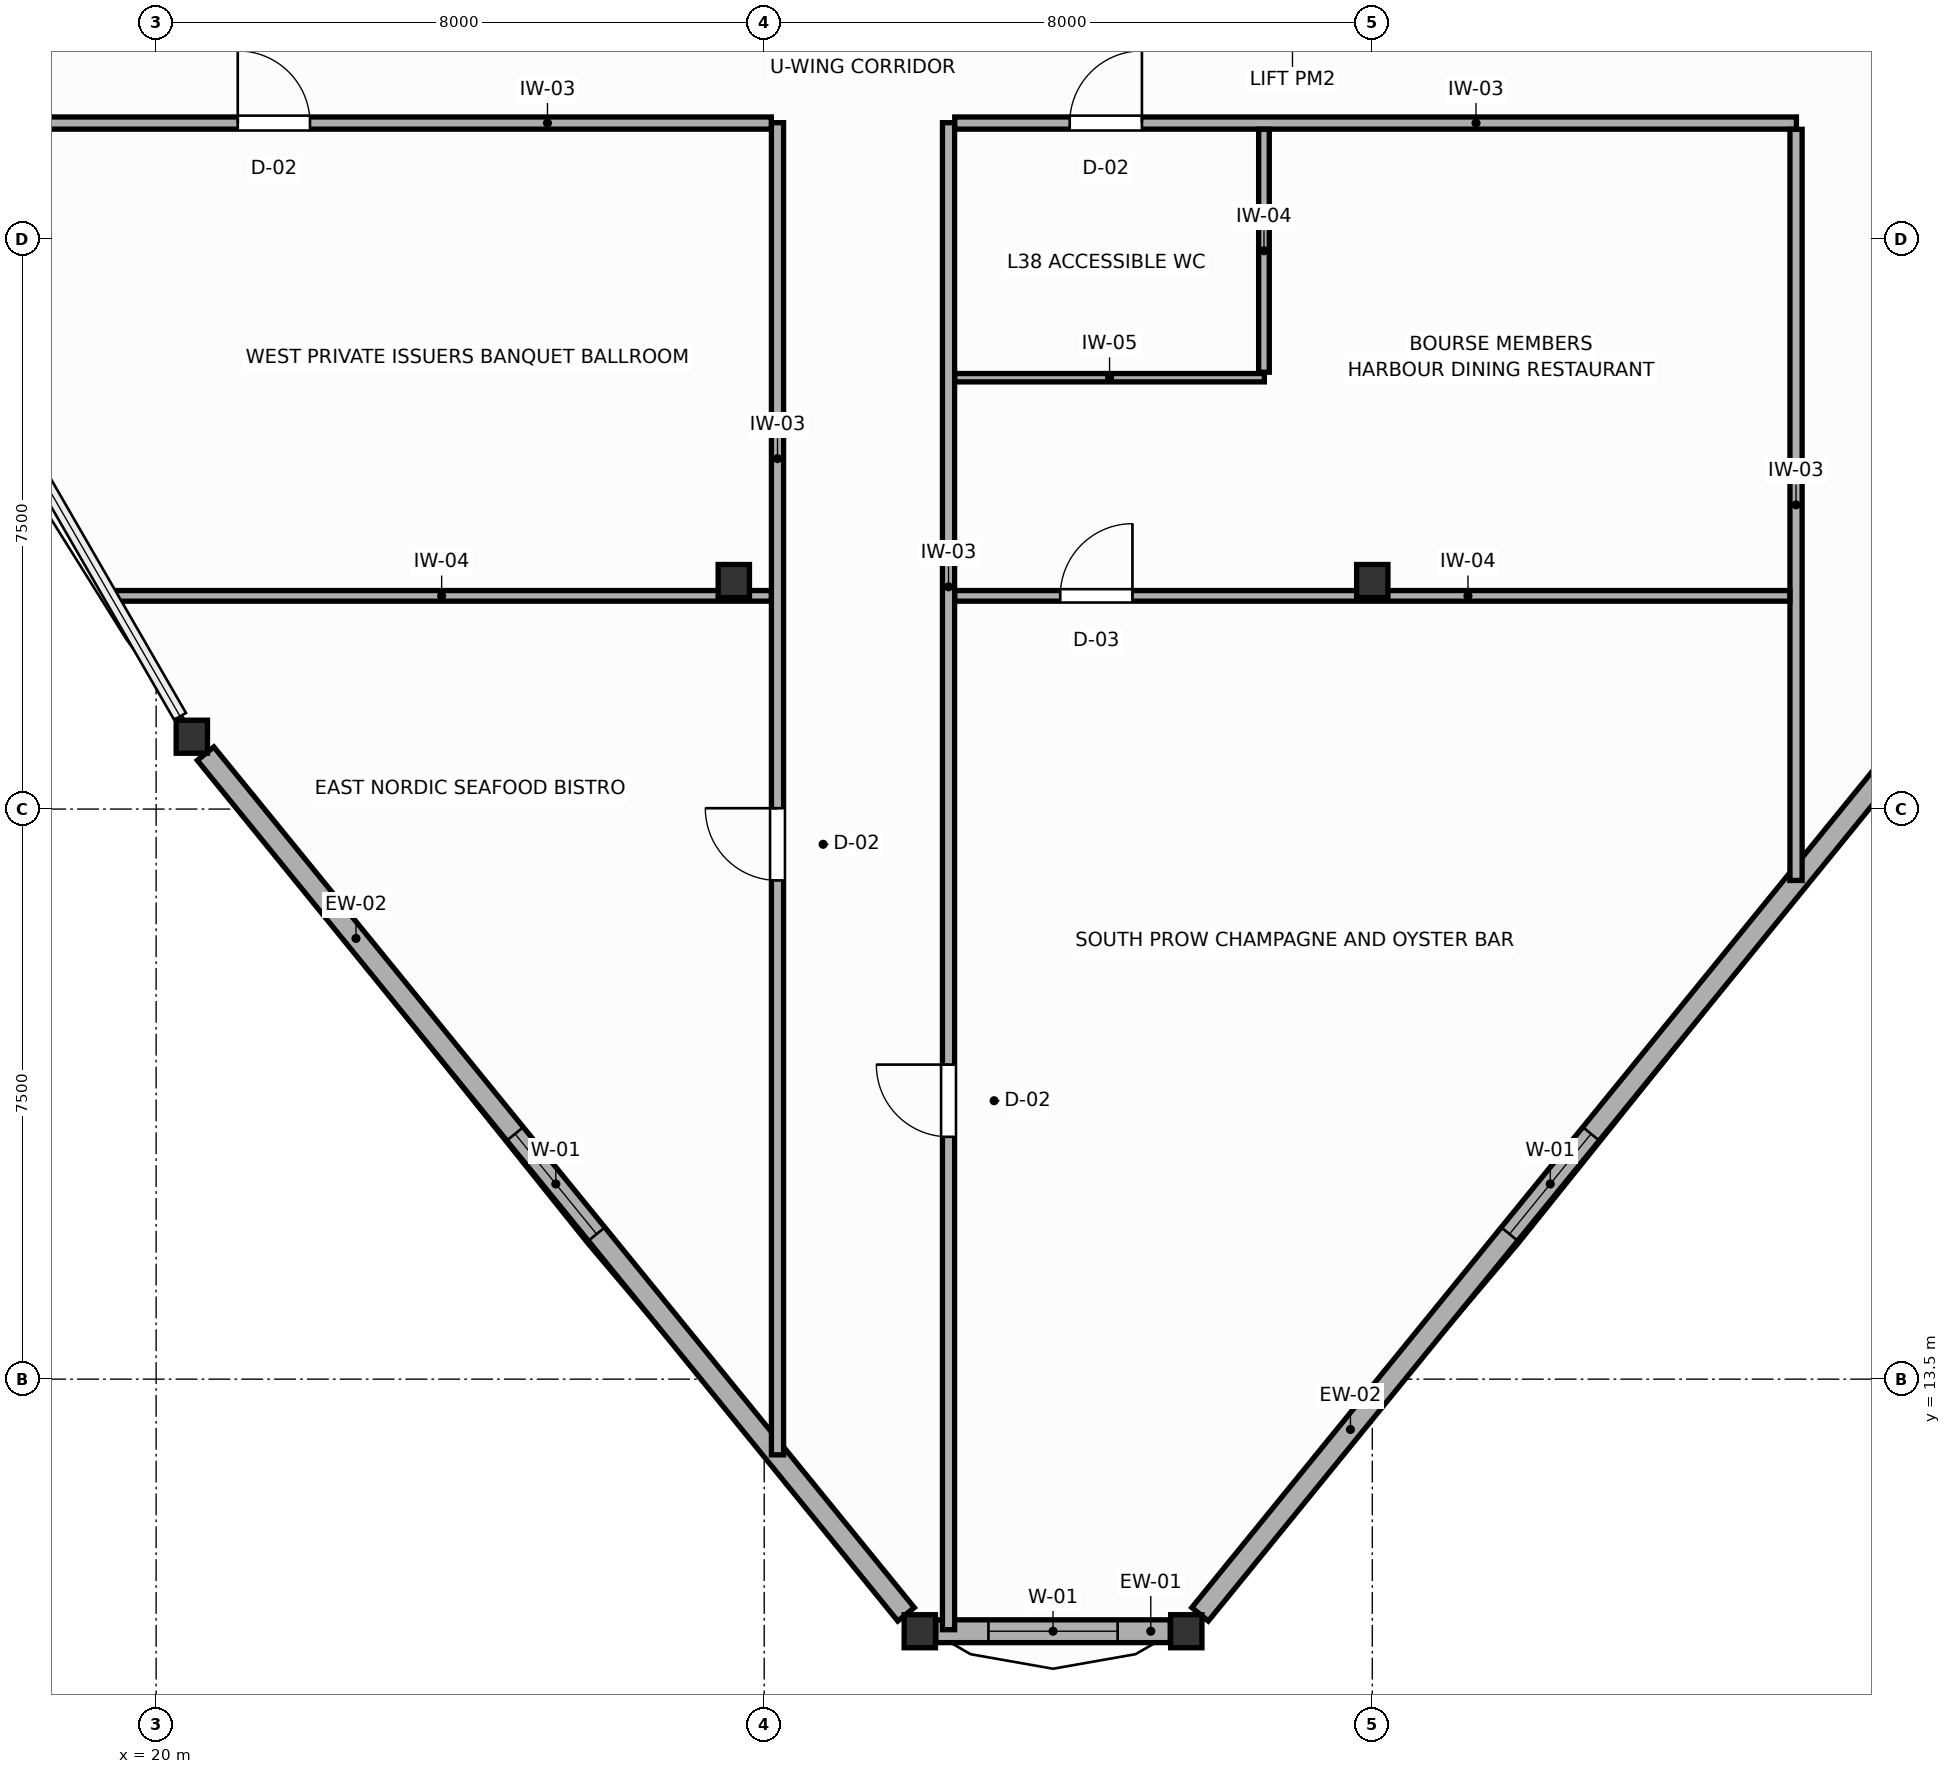
"""IFC4 building model, lengths in metres.
Left out: names, types, materials, properties, quantities, classifications, styles, units other than length and angle.
Written with IfcOpenShell. Run it as: python <this file> out.ifc"""

import sys

from ifc_helpers import new_model, si_unit, direction, frame, frame_2d, origin, origin_2d, place, context, subcontext, project, spatial, rectangle, i_section, extrude, source, transform, mapped, element, fill, save


model = new_model("IFC4")
c1 = context("Model", 3, precision=1e-05, world=origin(), true_north=direction((0.0, 1.0)))
c2 = subcontext(c1, "Body", "Model", "MODEL_VIEW")
j1 = project(units=[si_unit("LENGTHUNIT", "METRE"), si_unit("PLANEANGLEUNIT", "RADIAN")], contexts=[c1])
p1 = place(None, origin())
s1 = spatial("IfcSite", under=j1, at=p1, CompositionType="ELEMENT")
p2 = place(p1, origin())
s2 = spatial("IfcBuilding", under=s1, at=p2, CompositionType="ELEMENT")
p3 = place(p2, frame((0.0, 0.0, 150.6)))
s3 = spatial("IfcBuildingStorey", under=s2, at=p3, CompositionType="ELEMENT", Elevation=150.6)
m1 = source(origin(), c2, "Body", "SweptSolid", [
    extrude(i_section(OverallWidth=0.412, OverallDepth=0.435, WebThickness=0.033, FlangeThickness=0.053, FilletRadius=0.015, at=origin_2d()), origin(), (0.0, 0.0, 1.0), 3.6),
])
for number, where, z_axis, x_axis in (
    (1, (27.6, 24.0, 0.0), (0.0, 0.0, 1.0), (1.0, 0.0, 0.0)),
    (2, (36.0, 24.0, 0.0), (0.0, 0.0, 1.0), (1.0, 0.0, 0.0)),
    (3, (20.469, 21.952, 0.0), (0.0, 0.0, 1.0), (1.0, 0.0, 0.0)),
    (4, (30.047, 10.184, 0.0), (0.0, 0.0, 1.0), (1.0, 0.0, 0.0)),
    (5, (33.553, 10.184, 0.0), (0.0, 0.0, 1.0), (1.0, 0.0, 0.0)),
):
    element("IfcColumn", number, at=place(p3, frame(where, z_axis=z_axis, x_axis=x_axis)), inside=s3, PredefinedType="COLUMN", context=c2, shape_type="MappedRepresentation", body=[
        mapped(m1, transform((0.0, 0.0, 0.0), scale=1.0)),
    ])
p4 = place(p3, frame((20.651, 21.729, 0.0), z_axis=(0.0, 0.0, 1.0), x_axis=(0.631219465915, -0.775604271423, 0.0)))
e6 = element("IfcWall", 6, at=p4, inside=s3, PredefinedType="SOLIDWALL", context=c2, shape_type="SweptSolid", body=[
    extrude(rectangle(XDim=14.599, YDim=0.28, at=frame_2d((7.3, 0.0))), origin(), (0.0, 0.0, 1.0), 3.0),
])
p5 = place(p4, frame((6.45, 0.0, 0.75)))
e7 = element("IfcOpeningElement", 7, at=p5, cuts=e6, PredefinedType="OPENING", context=c2, shape_type="SweptSolid", body=[
    extrude(rectangle(XDim=1.7, YDim=1.75, at=frame_2d((0.85, 0.875))), frame((0.0, 0.15, 0.0), z_axis=(0.0, -1.0, 0.0), x_axis=(1.0, 0.0, 0.0)), (0.0, 0.0, 1.0), 0.3),
])
p6 = place(p3, frame((30.258, 10.184, 0.0), z_axis=(0.0, 0.0, 1.0), x_axis=(1.0, 0.0, 0.0)))
e8 = element("IfcWall", 8, at=p6, inside=s3, PredefinedType="SOLIDWALL", context=c2, shape_type="SweptSolid", body=[
    extrude(rectangle(XDim=3.084, YDim=0.3, at=frame_2d((1.542, 0.0))), origin(), (0.0, 0.0, 1.0), 3.0),
])
p7 = place(p6, frame((0.692, 0.0, 0.75)))
e9 = element("IfcOpeningElement", 9, at=p7, cuts=e8, PredefinedType="OPENING", context=c2, shape_type="SweptSolid", body=[
    extrude(rectangle(XDim=1.7, YDim=1.75, at=frame_2d((0.85, 0.875))), frame((0.0, 0.16, 0.0), z_axis=(0.0, -1.0, 0.0), x_axis=(1.0, 0.0, 0.0)), (0.0, 0.0, 1.0), 0.32),
])
p8 = place(p3, frame((33.734, 10.406, 0.0), z_axis=(0.0, 0.0, 1.0), x_axis=(0.631219465915, 0.775604271423, 0.0)))
e10 = element("IfcWall", 10, at=p8, inside=s3, PredefinedType="SOLIDWALL", context=c2, shape_type="SweptSolid", body=[
    extrude(rectangle(XDim=14.599, YDim=0.28, at=frame_2d((7.3, 0.0))), origin(), (0.0, 0.0, 1.0), 3.0),
])
p9 = place(p8, frame((6.45, 0.0, 0.75)))
e11 = element("IfcOpeningElement", 11, at=p9, cuts=e10, PredefinedType="OPENING", context=c2, shape_type="SweptSolid", body=[
    extrude(rectangle(XDim=1.7, YDim=1.75, at=frame_2d((0.85, 0.875))), frame((0.0, 0.15, 0.0), z_axis=(0.0, -1.0, 0.0), x_axis=(1.0, 0.0, 0.0)), (0.0, 0.0, 1.0), 0.3),
])
p10 = place(p3, frame((30.425, 10.204, 0.0), z_axis=(0.0, 0.0, 1.0), x_axis=(0.0, 1.0, 0.0)))
e12 = element("IfcWall", 12, at=p10, inside=s3, PredefinedType="PARTITIONING", context=c2, shape_type="SweptSolid", body=[
    extrude(rectangle(XDim=19.826, YDim=0.16, at=frame_2d((9.913, 0.0))), origin(), (0.0, 0.0, 1.0), 3.4),
])
p11 = place(p10, frame((6.484, 0.0, 0.0)))
e13 = element("IfcOpeningElement", 13, at=p11, cuts=e12, PredefinedType="OPENING", context=c2, shape_type="SweptSolid", body=[
    extrude(rectangle(XDim=0.95, YDim=2.05, at=frame_2d((0.475, 1.025))), frame((0.0, 0.09, 0.0), z_axis=(0.0, -1.0, 0.0), x_axis=(1.0, 0.0, 0.0)), (0.0, 0.0, 1.0), 0.18),
])
p12 = place(p3, frame((28.175, 12.504, 0.0), z_axis=(0.0, 0.0, 1.0), x_axis=(0.0, 1.0, 0.0)))
e14 = element("IfcWall", 14, at=p12, inside=s3, PredefinedType="PARTITIONING", context=c2, shape_type="SweptSolid", body=[
    extrude(rectangle(XDim=17.526, YDim=0.16, at=frame_2d((8.763, 0.0))), origin(), (0.0, 0.0, 1.0), 2.95),
])
p13 = place(p12, frame((7.557, 0.0, 0.0)))
e15 = element("IfcOpeningElement", 15, at=p13, cuts=e14, PredefinedType="OPENING", context=c2, shape_type="SweptSolid", body=[
    extrude(rectangle(XDim=0.95, YDim=2.05, at=frame_2d((0.475, 1.025))), frame((0.0, 0.09, 0.0), z_axis=(0.0, -1.0, 0.0), x_axis=(1.0, 0.0, 0.0)), (0.0, 0.0, 1.0), 0.18),
])
p14 = place(p3, frame((15.829, 30.025, 0.0), z_axis=(0.0, 0.0, 1.0), x_axis=(1.0, 0.0, 0.0)))
e16 = element("IfcWall", 16, at=p14, inside=s3, PredefinedType="PARTITIONING", context=c2, shape_type="SweptSolid", body=[
    extrude(rectangle(XDim=12.264, YDim=0.16, at=frame_2d((6.132, 0.0))), origin(), (0.0, 0.0, 1.0), 3.4),
])
p15 = place(p14, frame((5.245, 0.0, 0.0)))
e17 = element("IfcOpeningElement", 17, at=p15, cuts=e16, PredefinedType="OPENING", context=c2, shape_type="SweptSolid", body=[
    extrude(rectangle(XDim=0.95, YDim=2.05, at=frame_2d((0.475, 1.025))), frame((0.0, 0.09, 0.0), z_axis=(0.0, -1.0, 0.0), x_axis=(1.0, 0.0, 0.0)), (0.0, 0.0, 1.0), 0.18),
])
p16 = place(p3, frame((30.507, 30.025, 0.0), z_axis=(0.0, 0.0, 1.0), x_axis=(1.0, 0.0, 0.0)))
e18 = element("IfcWall", 18, at=p16, inside=s3, PredefinedType="PARTITIONING", context=c2, shape_type="SweptSolid", body=[
    extrude(rectangle(XDim=11.073, YDim=0.16, at=frame_2d((5.537, 0.0))), origin(), (0.0, 0.0, 1.0), 3.4),
])
p17 = place(p16, frame((1.512, 0.0, 0.0)))
e19 = element("IfcOpeningElement", 19, at=p17, cuts=e18, PredefinedType="OPENING", context=c2, shape_type="SweptSolid", body=[
    extrude(rectangle(XDim=0.95, YDim=2.05, at=frame_2d((0.475, 1.025))), frame((0.0, 0.09, 0.0), z_axis=(0.0, -1.0, 0.0), x_axis=(1.0, 0.0, 0.0)), (0.0, 0.0, 1.0), 0.18),
])
p18 = place(p3, frame((41.575, 20.061, 0.0), z_axis=(0.0, 0.0, 1.0), x_axis=(0.0, 1.0, 0.0)))
e20 = element("IfcWall", 20, at=p18, inside=s3, PredefinedType="PARTITIONING", context=c2, shape_type="SweptSolid", body=[
    extrude(rectangle(XDim=9.882, YDim=0.16, at=frame_2d((4.941, 0.0))), origin(), (0.0, 0.0, 1.0), 3.4),
])
p19 = place(p3, frame((30.507, 23.805, 0.0), z_axis=(0.0, 0.0, 1.0), x_axis=(1.0, 0.0, 0.0)))
e21 = element("IfcWall", 21, at=p19, inside=s3, PredefinedType="PARTITIONING", context=c2, shape_type="SweptSolid", body=[
    extrude(rectangle(XDim=10.986, YDim=0.14, at=frame_2d((5.493, 0.0))), origin(), (0.0, 0.0, 1.0), 2.95),
])
p20 = place(p19, frame((1.388, 0.0, 0.0)))
e22 = element("IfcOpeningElement", 22, at=p20, cuts=e21, PredefinedType="OPENING", context=c2, shape_type="SweptSolid", body=[
    extrude(rectangle(XDim=0.95, YDim=2.05, at=frame_2d((0.475, 1.025))), frame((0.0, 0.08, 0.0), z_axis=(0.0, -1.0, 0.0), x_axis=(1.0, 0.0, 0.0)), (0.0, 0.0, 1.0), 0.16),
])
p21 = place(p3, frame((19.42, 23.805, 0.0), z_axis=(0.0, 0.0, 1.0), x_axis=(1.0, 0.0, 0.0)))
e23 = element("IfcWall", 23, at=p21, inside=s3, PredefinedType="PARTITIONING", context=c2, shape_type="SweptSolid", body=[
    extrude(rectangle(XDim=8.673, YDim=0.14, at=frame_2d((4.337, 0.0))), origin(), (0.0, 0.0, 1.0), 2.95),
])
p22 = place(p3, frame((30.507, 26.675, 0.0), z_axis=(0.0, 0.0, 1.0), x_axis=(1.0, 0.0, 0.0)))
e24 = element("IfcWall", 24, at=p22, inside=s3, PredefinedType="MOVABLE", context=c2, shape_type="SweptSolid", body=[
    extrude(rectangle(XDim=4.073, YDim=0.11, at=frame_2d((2.037, 0.0))), origin(), (0.0, 0.0, 1.0), 3.4),
])
p23 = place(p3, frame((34.575, 26.747, 0.0), z_axis=(0.0, 0.0, 1.0), x_axis=(0.0, 1.0, 0.0)))
e25 = element("IfcWall", 25, at=p23, inside=s3, PredefinedType="PARTITIONING", context=c2, shape_type="SweptSolid", body=[
    extrude(rectangle(XDim=3.196, YDim=0.14, at=frame_2d((1.598, 0.0))), origin(), (0.0, 0.0, 1.0), 3.4),
])
p24 = place(p5, origin())
e26 = element("IfcWindow", 26, at=p24, inside=s3, PartitioningType="SINGLE_PANEL", PredefinedType="WINDOW", context=c2, shape_type="SweptSolid", body=[
    extrude(rectangle(XDim=1.7, YDim=1.75, at=frame_2d((0.85, 0.875))), frame((0.0, 0.03, 0.0), z_axis=(0.0, -1.0, 0.0), x_axis=(1.0, 0.0, 0.0)), (0.0, 0.0, 1.0), 0.06),
])
fill(e7, e26)
p25 = place(p7, origin())
e27 = element("IfcWindow", 27, at=p25, inside=s3, PartitioningType="SINGLE_PANEL", PredefinedType="WINDOW", context=c2, shape_type="SweptSolid", body=[
    extrude(rectangle(XDim=1.7, YDim=1.75, at=frame_2d((0.85, 0.875))), frame((0.0, 0.03, 0.0), z_axis=(0.0, -1.0, 0.0), x_axis=(1.0, 0.0, 0.0)), (0.0, 0.0, 1.0), 0.06),
])
fill(e9, e27)
p26 = place(p9, origin())
e28 = element("IfcWindow", 28, at=p26, inside=s3, PartitioningType="SINGLE_PANEL", PredefinedType="WINDOW", context=c2, shape_type="SweptSolid", body=[
    extrude(rectangle(XDim=1.7, YDim=1.75, at=frame_2d((0.85, 0.875))), frame((0.0, 0.03, 0.0), z_axis=(0.0, -1.0, 0.0), x_axis=(1.0, 0.0, 0.0)), (0.0, 0.0, 1.0), 0.06),
])
fill(e11, e28)
p27 = place(p11, origin())
e29 = element("IfcDoor", 29, at=p27, inside=s3, OperationType="SINGLE_SWING_RIGHT", PredefinedType="DOOR", context=c2, shape_type="SweptSolid", body=[
    extrude(rectangle(XDim=0.95, YDim=2.05, at=frame_2d((0.475, 1.025))), frame((0.0, 0.025, 0.0), z_axis=(0.0, -1.0, 0.0), x_axis=(1.0, 0.0, 0.0)), (0.0, 0.0, 1.0), 0.05),
])
fill(e13, e29)
p28 = place(p13, origin())
e30 = element("IfcDoor", 30, at=p28, inside=s3, OperationType="SINGLE_SWING_RIGHT", PredefinedType="DOOR", context=c2, shape_type="SweptSolid", body=[
    extrude(rectangle(XDim=0.95, YDim=2.05, at=frame_2d((0.475, 1.025))), frame((0.0, 0.025, 0.0), z_axis=(0.0, -1.0, 0.0), x_axis=(1.0, 0.0, 0.0)), (0.0, 0.0, 1.0), 0.05),
])
fill(e15, e30)
p29 = place(p15, origin())
e31 = element("IfcDoor", 31, at=p29, inside=s3, OperationType="SINGLE_SWING_LEFT", PredefinedType="DOOR", context=c2, shape_type="SweptSolid", body=[
    extrude(rectangle(XDim=0.95, YDim=2.05, at=frame_2d((0.475, 1.025))), frame((0.0, 0.025, 0.0), z_axis=(0.0, -1.0, 0.0), x_axis=(1.0, 0.0, 0.0)), (0.0, 0.0, 1.0), 0.05),
])
fill(e17, e31)
p30 = place(p17, origin())
e32 = element("IfcDoor", 32, at=p30, inside=s3, OperationType="SINGLE_SWING_RIGHT", PredefinedType="DOOR", context=c2, shape_type="SweptSolid", body=[
    extrude(rectangle(XDim=0.95, YDim=2.05, at=frame_2d((0.475, 1.025))), frame((0.0, 0.025, 0.0), z_axis=(0.0, -1.0, 0.0), x_axis=(1.0, 0.0, 0.0)), (0.0, 0.0, 1.0), 0.05),
])
fill(e19, e32)
p31 = place(p20, origin())
e33 = element("IfcDoor", 33, at=p31, inside=s3, OperationType="SINGLE_SWING_RIGHT", PredefinedType="DOOR", context=c2, shape_type="SweptSolid", body=[
    extrude(rectangle(XDim=0.95, YDim=2.05, at=frame_2d((0.475, 1.025))), frame((0.0, 0.025, 0.0), z_axis=(0.0, -1.0, 0.0), x_axis=(1.0, 0.0, 0.0)), (0.0, 0.0, 1.0), 0.05),
])
fill(e22, e33)
save(model, sys.argv[1])
